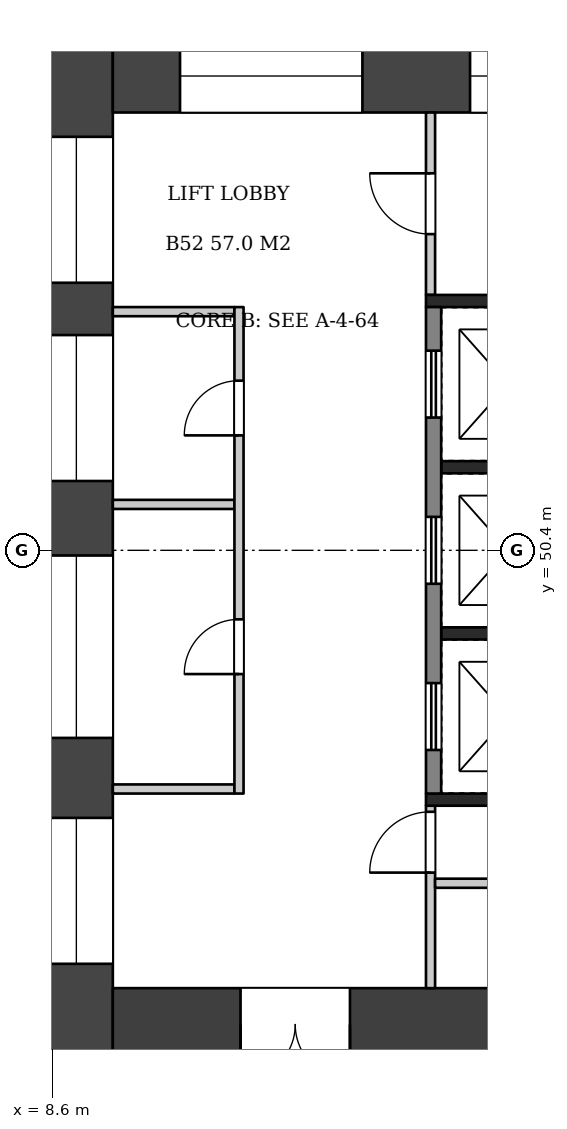
"""IFC4 building model, lengths in metres.
Left out: names, types, materials, properties, quantities, classifications, styles, units other than length and angle.
Written with IfcOpenShell. Run it as: python <this file> out.ifc"""

import sys

from ifc_helpers import new_model, si_unit, direction, frame, frame_2d, origin, place, context, subcontext, project, spatial, rectangle, extrude, element, fill, save


model = new_model("IFC4")
c1 = context("Model", 3, precision=1e-05, world=origin(), true_north=direction((0.0, 1.0)))
c2 = subcontext(c1, "Body", "Model", "MODEL_VIEW")
j1 = project(units=[si_unit("LENGTHUNIT", "METRE"), si_unit("PLANEANGLEUNIT", "RADIAN")], contexts=[c1])
p1 = place(None, origin())
s1 = spatial("IfcSite", under=j1, at=p1, CompositionType="ELEMENT")
p2 = place(p1, origin())
s2 = spatial("IfcBuilding", under=s1, at=p2, CompositionType="ELEMENT")
p3 = place(p2, frame((0.0, 0.0, 200.2)))
s3 = spatial("IfcBuildingStorey", under=s2, at=p3, CompositionType="ELEMENT", Elevation=200.2)
p4 = place(p3, frame((9.0, 58.8, 0.0), z_axis=(0.0, 0.0, 1.0), x_axis=(0.0, -1.0, 0.0)))
e1 = element("IfcWall", 1, at=p4, inside=s3, PredefinedType="SHEAR", context=c2, shape_type="SweptSolid", body=[
    extrude(rectangle(XDim=16.8, YDim=1.2, at=frame_2d((8.4, 0.0))), origin(), (0.0, 0.0, 1.0), 3.22),
])
p5 = place(p4, frame((1.6, 0.0, 0.6)))
e2 = element("IfcOpeningElement", 2, at=p5, cuts=e1, PredefinedType="OPENING", context=c2, shape_type="SweptSolid", body=[
    extrude(rectangle(XDim=2.4, YDim=2.1, at=frame_2d((1.2, 1.05))), frame((0.0, 0.61, 0.0), z_axis=(0.0, -1.0, 0.0), x_axis=(1.0, 0.0, 0.0)), (0.0, 0.0, 1.0), 1.22),
])
p6 = place(p4, frame((4.86, 0.0, 1.6)))
e3 = element("IfcOpeningElement", 3, at=p6, cuts=e1, PredefinedType="OPENING", context=c2, shape_type="SweptSolid", body=[
    extrude(rectangle(XDim=2.4, YDim=1.2, at=frame_2d((1.2, 0.6))), frame((0.0, 0.61, 0.0), z_axis=(0.0, -1.0, 0.0), x_axis=(1.0, 0.0, 0.0)), (0.0, 0.0, 1.0), 1.22),
])
p7 = place(p4, frame((8.485, 0.0, 1.6)))
e4 = element("IfcOpeningElement", 4, at=p7, cuts=e1, PredefinedType="OPENING", context=c2, shape_type="SweptSolid", body=[
    extrude(rectangle(XDim=3.0, YDim=1.2, at=frame_2d((1.5, 0.6))), frame((0.0, 0.61, 0.0), z_axis=(0.0, -1.0, 0.0), x_axis=(1.0, 0.0, 0.0)), (0.0, 0.0, 1.0), 1.22),
])
p8 = place(p4, frame((12.8, 0.0, 0.6)))
e5 = element("IfcOpeningElement", 5, at=p8, cuts=e1, PredefinedType="OPENING", context=c2, shape_type="SweptSolid", body=[
    extrude(rectangle(XDim=2.4, YDim=2.1, at=frame_2d((1.2, 1.05))), frame((0.0, 0.61, 0.0), z_axis=(0.0, -1.0, 0.0), x_axis=(1.0, 0.0, 0.0)), (0.0, 0.0, 1.0), 1.22),
])
p9 = place(p3, frame((9.6, 58.2, 0.0), z_axis=(0.0, 0.0, 1.0), x_axis=(1.0, 0.0, 0.0)))
e6 = element("IfcWall", 6, at=p9, inside=s3, PredefinedType="SHEAR", context=c2, shape_type="SweptSolid", body=[
    extrude(rectangle(XDim=14.4, YDim=1.2, at=frame_2d((7.2, 0.0))), origin(), (0.0, 0.0, 1.0), 3.22),
])
p10 = place(p9, frame((1.105, 0.0, 0.6)))
e7 = element("IfcOpeningElement", 7, at=p10, cuts=e6, PredefinedType="OPENING", context=c2, shape_type="SweptSolid", body=[
    extrude(rectangle(XDim=3.0, YDim=2.1, at=frame_2d((1.5, 1.05))), frame((0.0, 0.61, 0.0), z_axis=(0.0, -1.0, 0.0), x_axis=(1.0, 0.0, 0.0)), (0.0, 0.0, 1.0), 1.22),
])
p11 = place(p9, frame((5.875, 0.0, 0.6)))
e8 = element("IfcOpeningElement", 8, at=p11, cuts=e6, PredefinedType="OPENING", context=c2, shape_type="SweptSolid", body=[
    extrude(rectangle(XDim=2.4, YDim=2.1, at=frame_2d((1.2, 1.05))), frame((0.0, 0.61, 0.0), z_axis=(0.0, -1.0, 0.0), x_axis=(1.0, 0.0, 0.0)), (0.0, 0.0, 1.0), 1.22),
])
p12 = place(p9, frame((9.993, 0.0, 0.5)))
e9 = element("IfcOpeningElement", 9, at=p12, cuts=e6, PredefinedType="OPENING", context=c2, shape_type="SweptSolid", body=[
    extrude(rectangle(XDim=1.2, YDim=2.4, at=frame_2d((0.6, 1.2))), frame((0.0, 0.61, 0.0), z_axis=(0.0, -1.0, 0.0), x_axis=(1.0, 0.0, 0.0)), (0.0, 0.0, 1.0), 1.22),
])
p13 = place(p9, frame((12.197, 0.0, 0.5)))
e10 = element("IfcOpeningElement", 10, at=p13, cuts=e6, PredefinedType="OPENING", context=c2, shape_type="SweptSolid", body=[
    extrude(rectangle(XDim=1.2, YDim=2.4, at=frame_2d((0.6, 1.2))), frame((0.0, 0.61, 0.0), z_axis=(0.0, -1.0, 0.0), x_axis=(1.0, 0.0, 0.0)), (0.0, 0.0, 1.0), 1.22),
])
p14 = place(p3, frame((9.6, 42.6, 0.0), z_axis=(0.0, 0.0, 1.0), x_axis=(1.0, 0.0, 0.0)))
e11 = element("IfcWall", 11, at=p14, inside=s3, PredefinedType="SHEAR", context=c2, shape_type="SweptSolid", body=[
    extrude(rectangle(XDim=14.4, YDim=1.2, at=frame_2d((7.2, 0.0))), origin(), (0.0, 0.0, 1.0), 3.22),
])
p15 = place(p14, frame((2.1, 0.0, 0.0)))
e12 = element("IfcOpeningElement", 12, at=p15, cuts=e11, PredefinedType="OPENING", context=c2, shape_type="SweptSolid", body=[
    extrude(rectangle(XDim=1.8, YDim=2.1, at=frame_2d((0.9, 1.05))), frame((0.0, 0.61, 0.0), z_axis=(0.0, -1.0, 0.0), x_axis=(1.0, 0.0, 0.0)), (0.0, 0.0, 1.0), 1.22),
])
for number, where, z_axis, x_axis in (
    (13, (9.6, 54.325, 0.0), (0.0, 0.0, 1.0), (1.0, 0.0, 0.0)),
    (14, (9.6, 46.475, 0.0), (0.0, 0.0, 1.0), (1.0, 0.0, 0.0)),
    (15, (9.6, 51.155, 0.0), (0.0, 0.0, 1.0), (1.0, 0.0, 0.0)),
):
    element("IfcWall", number, at=place(p3, frame(where, z_axis=z_axis, x_axis=x_axis)), inside=s3, PredefinedType="PARTITIONING", context=c2, shape_type="SweptSolid", body=[
        extrude(rectangle(XDim=2.0, YDim=0.15, at=frame_2d((1.0, 0.0))), origin(), (0.0, 0.0, 1.0), 3.22),
    ])
p16 = place(p3, frame((11.675, 54.4, 0.0), z_axis=(0.0, 0.0, 1.0), x_axis=(0.0, -1.0, 0.0)))
e16 = element("IfcWall", 16, at=p16, inside=s3, PredefinedType="PARTITIONING", context=c2, shape_type="SweptSolid", body=[
    extrude(rectangle(XDim=8.0, YDim=0.15, at=frame_2d((4.0, 0.0))), origin(), (0.0, 0.0, 1.0), 3.22),
])
p17 = place(p16, frame((1.21, 0.0, 0.0)))
e17 = element("IfcOpeningElement", 17, at=p17, cuts=e16, PredefinedType="OPENING", context=c2, shape_type="SweptSolid", body=[
    extrude(rectangle(XDim=0.9, YDim=2.1, at=frame_2d((0.45, 1.05))), frame((0.0, 0.085, 0.0), z_axis=(0.0, -1.0, 0.0), x_axis=(1.0, 0.0, 0.0)), (0.0, 0.0, 1.0), 0.17),
])
p18 = place(p16, frame((5.135, 0.0, 0.0)))
e18 = element("IfcOpeningElement", 18, at=p18, cuts=e16, PredefinedType="OPENING", context=c2, shape_type="SweptSolid", body=[
    extrude(rectangle(XDim=0.9, YDim=2.1, at=frame_2d((0.45, 1.05))), frame((0.0, 0.085, 0.0), z_axis=(0.0, -1.0, 0.0), x_axis=(1.0, 0.0, 0.0)), (0.0, 0.0, 1.0), 0.17),
])
for number, where, z_axis, x_axis in (
    (19, (15.0, 51.767, 0.0), (0.0, 0.0, 1.0), (1.0, 0.0, 0.0)),
    (20, (15.0, 49.033, 0.0), (0.0, 0.0, 1.0), (1.0, 0.0, 0.0)),
):
    element("IfcWall", number, at=place(p3, frame(where, z_axis=z_axis, x_axis=x_axis)), inside=s3, PredefinedType="SHEAR", context=c2, shape_type="SweptSolid", body=[
        extrude(rectangle(XDim=1.9, YDim=0.2, at=frame_2d((0.95, 0.0))), origin(), (0.0, 0.0, 1.0), 3.22),
    ])
p19 = place(p3, frame((14.875, 54.4, 0.0), z_axis=(0.0, 0.0, 1.0), x_axis=(0.0, -1.0, 0.0)))
e21 = element("IfcWall", 21, at=p19, inside=s3, PredefinedType="SHEAR", context=c2, shape_type="SweptSolid", body=[
    extrude(rectangle(XDim=8.0, YDim=0.25, at=frame_2d((4.0, 0.0))), origin(), (0.0, 0.0, 1.0), 3.22),
])
p20 = place(p19, frame((0.717, 0.0, 0.0)))
e22 = element("IfcOpeningElement", 22, at=p20, cuts=e21, PredefinedType="OPENING", context=c2, shape_type="SweptSolid", body=[
    extrude(rectangle(XDim=1.1, YDim=2.1, at=frame_2d((0.55, 1.05))), frame((0.0, 0.135, 0.0), z_axis=(0.0, -1.0, 0.0), x_axis=(1.0, 0.0, 0.0)), (0.0, 0.0, 1.0), 0.27),
])
p21 = place(p19, frame((3.45, 0.0, 0.0)))
e23 = element("IfcOpeningElement", 23, at=p21, cuts=e21, PredefinedType="OPENING", context=c2, shape_type="SweptSolid", body=[
    extrude(rectangle(XDim=1.1, YDim=2.1, at=frame_2d((0.55, 1.05))), frame((0.0, 0.135, 0.0), z_axis=(0.0, -1.0, 0.0), x_axis=(1.0, 0.0, 0.0)), (0.0, 0.0, 1.0), 0.27),
])
p22 = place(p19, frame((6.183, 0.0, 0.0)))
e24 = element("IfcOpeningElement", 24, at=p22, cuts=e21, PredefinedType="OPENING", context=c2, shape_type="SweptSolid", body=[
    extrude(rectangle(XDim=1.1, YDim=2.1, at=frame_2d((0.55, 1.05))), frame((0.0, 0.135, 0.0), z_axis=(0.0, -1.0, 0.0), x_axis=(1.0, 0.0, 0.0)), (0.0, 0.0, 1.0), 0.27),
])
p23 = place(p3, frame((14.75, 54.5, 0.0), z_axis=(0.0, 0.0, 1.0), x_axis=(1.0, 0.0, 0.0)))
e25 = element("IfcWall", 25, at=p23, inside=s3, PredefinedType="SHEAR", context=c2, shape_type="SweptSolid", body=[
    extrude(rectangle(XDim=2.4, YDim=0.2, at=frame_2d((1.2, 0.0))), origin(), (0.0, 0.0, 1.0), 3.22),
])
p24 = place(p3, frame((14.825, 57.6, 0.0), z_axis=(0.0, 0.0, 1.0), x_axis=(0.0, -1.0, 0.0)))
e26 = element("IfcWall", 26, at=p24, inside=s3, PredefinedType="PARTITIONING", context=c2, shape_type="SweptSolid", body=[
    extrude(rectangle(XDim=3.0, YDim=0.15, at=frame_2d((1.5, 0.0))), origin(), (0.0, 0.0, 1.0), 3.22),
])
p25 = place(p24, frame((1.0, 0.0, 0.0)))
e27 = element("IfcOpeningElement", 27, at=p25, cuts=e26, PredefinedType="OPENING", context=c2, shape_type="SweptSolid", body=[
    extrude(rectangle(XDim=1.0, YDim=2.1, at=frame_2d((0.5, 1.05))), frame((0.0, 0.085, 0.0), z_axis=(0.0, -1.0, 0.0), x_axis=(1.0, 0.0, 0.0)), (0.0, 0.0, 1.0), 0.17),
])
p26 = place(p3, frame((14.75, 46.3, 0.0), z_axis=(0.0, 0.0, 1.0), x_axis=(1.0, 0.0, 0.0)))
e28 = element("IfcWall", 28, at=p26, inside=s3, PredefinedType="SHEAR", context=c2, shape_type="SweptSolid", body=[
    extrude(rectangle(XDim=9.25, YDim=0.2, at=frame_2d((4.625, 0.0))), origin(), (0.0, 0.0, 1.0), 3.22),
])
p27 = place(p3, frame((14.825, 46.2, 0.0), z_axis=(0.0, 0.0, 1.0), x_axis=(0.0, -1.0, 0.0)))
e29 = element("IfcWall", 29, at=p27, inside=s3, PredefinedType="PARTITIONING", context=c2, shape_type="SweptSolid", body=[
    extrude(rectangle(XDim=3.0, YDim=0.15, at=frame_2d((1.5, 0.0))), origin(), (0.0, 0.0, 1.0), 3.22),
])
p28 = place(p27, frame((0.1, 0.0, 0.0)))
e30 = element("IfcOpeningElement", 30, at=p28, cuts=e29, PredefinedType="OPENING", context=c2, shape_type="SweptSolid", body=[
    extrude(rectangle(XDim=1.0, YDim=2.1, at=frame_2d((0.5, 1.05))), frame((0.0, 0.085, 0.0), z_axis=(0.0, -1.0, 0.0), x_axis=(1.0, 0.0, 0.0)), (0.0, 0.0, 1.0), 0.17),
])
p29 = place(p3, frame((14.9, 44.925, 0.0), z_axis=(0.0, 0.0, 1.0), x_axis=(1.0, 0.0, 0.0)))
e31 = element("IfcWall", 31, at=p29, inside=s3, PredefinedType="PARTITIONING", context=c2, shape_type="SweptSolid", body=[
    extrude(rectangle(XDim=9.1, YDim=0.15, at=frame_2d((4.55, 0.0))), origin(), (0.0, 0.0, 1.0), 3.22),
])
p30 = place(p29, frame((0.893, 0.0, 0.0)))
e32 = element("IfcOpeningElement", 32, at=p30, cuts=e31, PredefinedType="OPENING", context=c2, shape_type="SweptSolid", body=[
    extrude(rectangle(XDim=0.9, YDim=2.1, at=frame_2d((0.45, 1.05))), frame((0.0, 0.085, 0.0), z_axis=(0.0, -1.0, 0.0), x_axis=(1.0, 0.0, 0.0)), (0.0, 0.0, 1.0), 0.17),
])
p31 = place(p29, frame((5.518, 0.0, 0.0)))
e33 = element("IfcOpeningElement", 33, at=p31, cuts=e31, PredefinedType="OPENING", context=c2, shape_type="SweptSolid", body=[
    extrude(rectangle(XDim=0.9, YDim=2.1, at=frame_2d((0.45, 1.05))), frame((0.0, 0.085, 0.0), z_axis=(0.0, -1.0, 0.0), x_axis=(1.0, 0.0, 0.0)), (0.0, 0.0, 1.0), 0.17),
])
p32 = place(p15, frame((1.8, 0.0, 0.0), z_axis=(0.0, 0.0, 1.0), x_axis=(-1.0, 0.0, 0.0)))
e34 = element("IfcDoor", 34, at=p32, inside=s3, OperationType="DOUBLE_DOOR_SINGLE_SWING", PredefinedType="DOOR", context=c2, shape_type="SweptSolid", body=[
    extrude(rectangle(XDim=1.8, YDim=2.1, at=frame_2d((0.9, 1.05))), frame((0.0, 0.025, 0.0), z_axis=(0.0, -1.0, 0.0), x_axis=(1.0, 0.0, 0.0)), (0.0, 0.0, 1.0), 0.05),
])
fill(e12, e34)
p33 = place(p17, frame((0.9, 0.0, 0.0), z_axis=(0.0, 0.0, 1.0), x_axis=(-1.0, 0.0, 0.0)))
e35 = element("IfcDoor", 35, at=p33, inside=s3, OperationType="SINGLE_SWING_LEFT", PredefinedType="DOOR", context=c2, shape_type="SweptSolid", body=[
    extrude(rectangle(XDim=0.9, YDim=2.1, at=frame_2d((0.45, 1.05))), frame((0.0, 0.025, 0.0), z_axis=(0.0, -1.0, 0.0), x_axis=(1.0, 0.0, 0.0)), (0.0, 0.0, 1.0), 0.05),
])
fill(e17, e35)
p34 = place(p18, frame((0.9, 0.0, 0.0), z_axis=(0.0, 0.0, 1.0), x_axis=(-1.0, 0.0, 0.0)))
e36 = element("IfcDoor", 36, at=p34, inside=s3, OperationType="SINGLE_SWING_LEFT", PredefinedType="DOOR", context=c2, shape_type="SweptSolid", body=[
    extrude(rectangle(XDim=0.9, YDim=2.1, at=frame_2d((0.45, 1.05))), frame((0.0, 0.025, 0.0), z_axis=(0.0, -1.0, 0.0), x_axis=(1.0, 0.0, 0.0)), (0.0, 0.0, 1.0), 0.05),
])
fill(e18, e36)
p35 = place(p20, origin())
e37 = element("IfcDoor", 37, at=p35, inside=s3, OperationType="DOUBLE_DOOR_SLIDING", PredefinedType="DOOR", context=c2, shape_type="SweptSolid", body=[
    extrude(rectangle(XDim=1.1, YDim=2.1, at=frame_2d((0.55, 1.05))), frame((0.0, 0.025, 0.0), z_axis=(0.0, -1.0, 0.0), x_axis=(1.0, 0.0, 0.0)), (0.0, 0.0, 1.0), 0.05),
])
fill(e22, e37)
p36 = place(p21, origin())
e38 = element("IfcDoor", 38, at=p36, inside=s3, OperationType="DOUBLE_DOOR_SLIDING", PredefinedType="DOOR", context=c2, shape_type="SweptSolid", body=[
    extrude(rectangle(XDim=1.1, YDim=2.1, at=frame_2d((0.55, 1.05))), frame((0.0, 0.025, 0.0), z_axis=(0.0, -1.0, 0.0), x_axis=(1.0, 0.0, 0.0)), (0.0, 0.0, 1.0), 0.05),
])
fill(e23, e38)
p37 = place(p22, origin())
e39 = element("IfcDoor", 39, at=p37, inside=s3, OperationType="DOUBLE_DOOR_SLIDING", PredefinedType="DOOR", context=c2, shape_type="SweptSolid", body=[
    extrude(rectangle(XDim=1.1, YDim=2.1, at=frame_2d((0.55, 1.05))), frame((0.0, 0.025, 0.0), z_axis=(0.0, -1.0, 0.0), x_axis=(1.0, 0.0, 0.0)), (0.0, 0.0, 1.0), 0.05),
])
fill(e24, e39)
p38 = place(p25, frame((1.0, 0.0, 0.0), z_axis=(0.0, 0.0, 1.0), x_axis=(-1.0, 0.0, 0.0)))
e40 = element("IfcDoor", 40, at=p38, inside=s3, OperationType="SINGLE_SWING_RIGHT", PredefinedType="DOOR", context=c2, shape_type="SweptSolid", body=[
    extrude(rectangle(XDim=1.0, YDim=2.1, at=frame_2d((0.5, 1.05))), frame((0.0, 0.025, 0.0), z_axis=(0.0, -1.0, 0.0), x_axis=(1.0, 0.0, 0.0)), (0.0, 0.0, 1.0), 0.05),
])
fill(e27, e40)
p39 = place(p28, frame((1.0, 0.0, 0.0), z_axis=(0.0, 0.0, 1.0), x_axis=(-1.0, 0.0, 0.0)))
e41 = element("IfcDoor", 41, at=p39, inside=s3, OperationType="SINGLE_SWING_LEFT", PredefinedType="DOOR", context=c2, shape_type="SweptSolid", body=[
    extrude(rectangle(XDim=1.0, YDim=2.1, at=frame_2d((0.5, 1.05))), frame((0.0, 0.025, 0.0), z_axis=(0.0, -1.0, 0.0), x_axis=(1.0, 0.0, 0.0)), (0.0, 0.0, 1.0), 0.05),
])
fill(e30, e41)
p40 = place(p5, origin())
e42 = element("IfcWindow", 42, at=p40, inside=s3, PartitioningType="SINGLE_PANEL", PredefinedType="WINDOW", context=c2, shape_type="SweptSolid", body=[
    extrude(rectangle(XDim=2.4, YDim=2.1, at=frame_2d((1.2, 1.05))), frame((0.0, 0.03, 0.0), z_axis=(0.0, -1.0, 0.0), x_axis=(1.0, 0.0, 0.0)), (0.0, 0.0, 1.0), 0.06),
])
fill(e2, e42)
p41 = place(p6, origin())
e43 = element("IfcWindow", 43, at=p41, inside=s3, PartitioningType="SINGLE_PANEL", PredefinedType="WINDOW", context=c2, shape_type="SweptSolid", body=[
    extrude(rectangle(XDim=2.4, YDim=1.2, at=frame_2d((1.2, 0.6))), frame((0.0, 0.03, 0.0), z_axis=(0.0, -1.0, 0.0), x_axis=(1.0, 0.0, 0.0)), (0.0, 0.0, 1.0), 0.06),
])
fill(e3, e43)
p42 = place(p7, origin())
e44 = element("IfcWindow", 44, at=p42, inside=s3, PartitioningType="SINGLE_PANEL", PredefinedType="WINDOW", context=c2, shape_type="SweptSolid", body=[
    extrude(rectangle(XDim=3.0, YDim=1.2, at=frame_2d((1.5, 0.6))), frame((0.0, 0.03, 0.0), z_axis=(0.0, -1.0, 0.0), x_axis=(1.0, 0.0, 0.0)), (0.0, 0.0, 1.0), 0.06),
])
fill(e4, e44)
p43 = place(p8, origin())
e45 = element("IfcWindow", 45, at=p43, inside=s3, PartitioningType="SINGLE_PANEL", PredefinedType="WINDOW", context=c2, shape_type="SweptSolid", body=[
    extrude(rectangle(XDim=2.4, YDim=2.1, at=frame_2d((1.2, 1.05))), frame((0.0, 0.03, 0.0), z_axis=(0.0, -1.0, 0.0), x_axis=(1.0, 0.0, 0.0)), (0.0, 0.0, 1.0), 0.06),
])
fill(e5, e45)
p44 = place(p10, origin())
e46 = element("IfcWindow", 46, at=p44, inside=s3, PartitioningType="SINGLE_PANEL", PredefinedType="WINDOW", context=c2, shape_type="SweptSolid", body=[
    extrude(rectangle(XDim=3.0, YDim=2.1, at=frame_2d((1.5, 1.05))), frame((0.0, 0.03, 0.0), z_axis=(0.0, -1.0, 0.0), x_axis=(1.0, 0.0, 0.0)), (0.0, 0.0, 1.0), 0.06),
])
fill(e7, e46)
p45 = place(p11, origin())
e47 = element("IfcWindow", 47, at=p45, inside=s3, PartitioningType="SINGLE_PANEL", PredefinedType="WINDOW", context=c2, shape_type="SweptSolid", body=[
    extrude(rectangle(XDim=2.4, YDim=2.1, at=frame_2d((1.2, 1.05))), frame((0.0, 0.03, 0.0), z_axis=(0.0, -1.0, 0.0), x_axis=(1.0, 0.0, 0.0)), (0.0, 0.0, 1.0), 0.06),
])
fill(e8, e47)
save(model, sys.argv[1])
